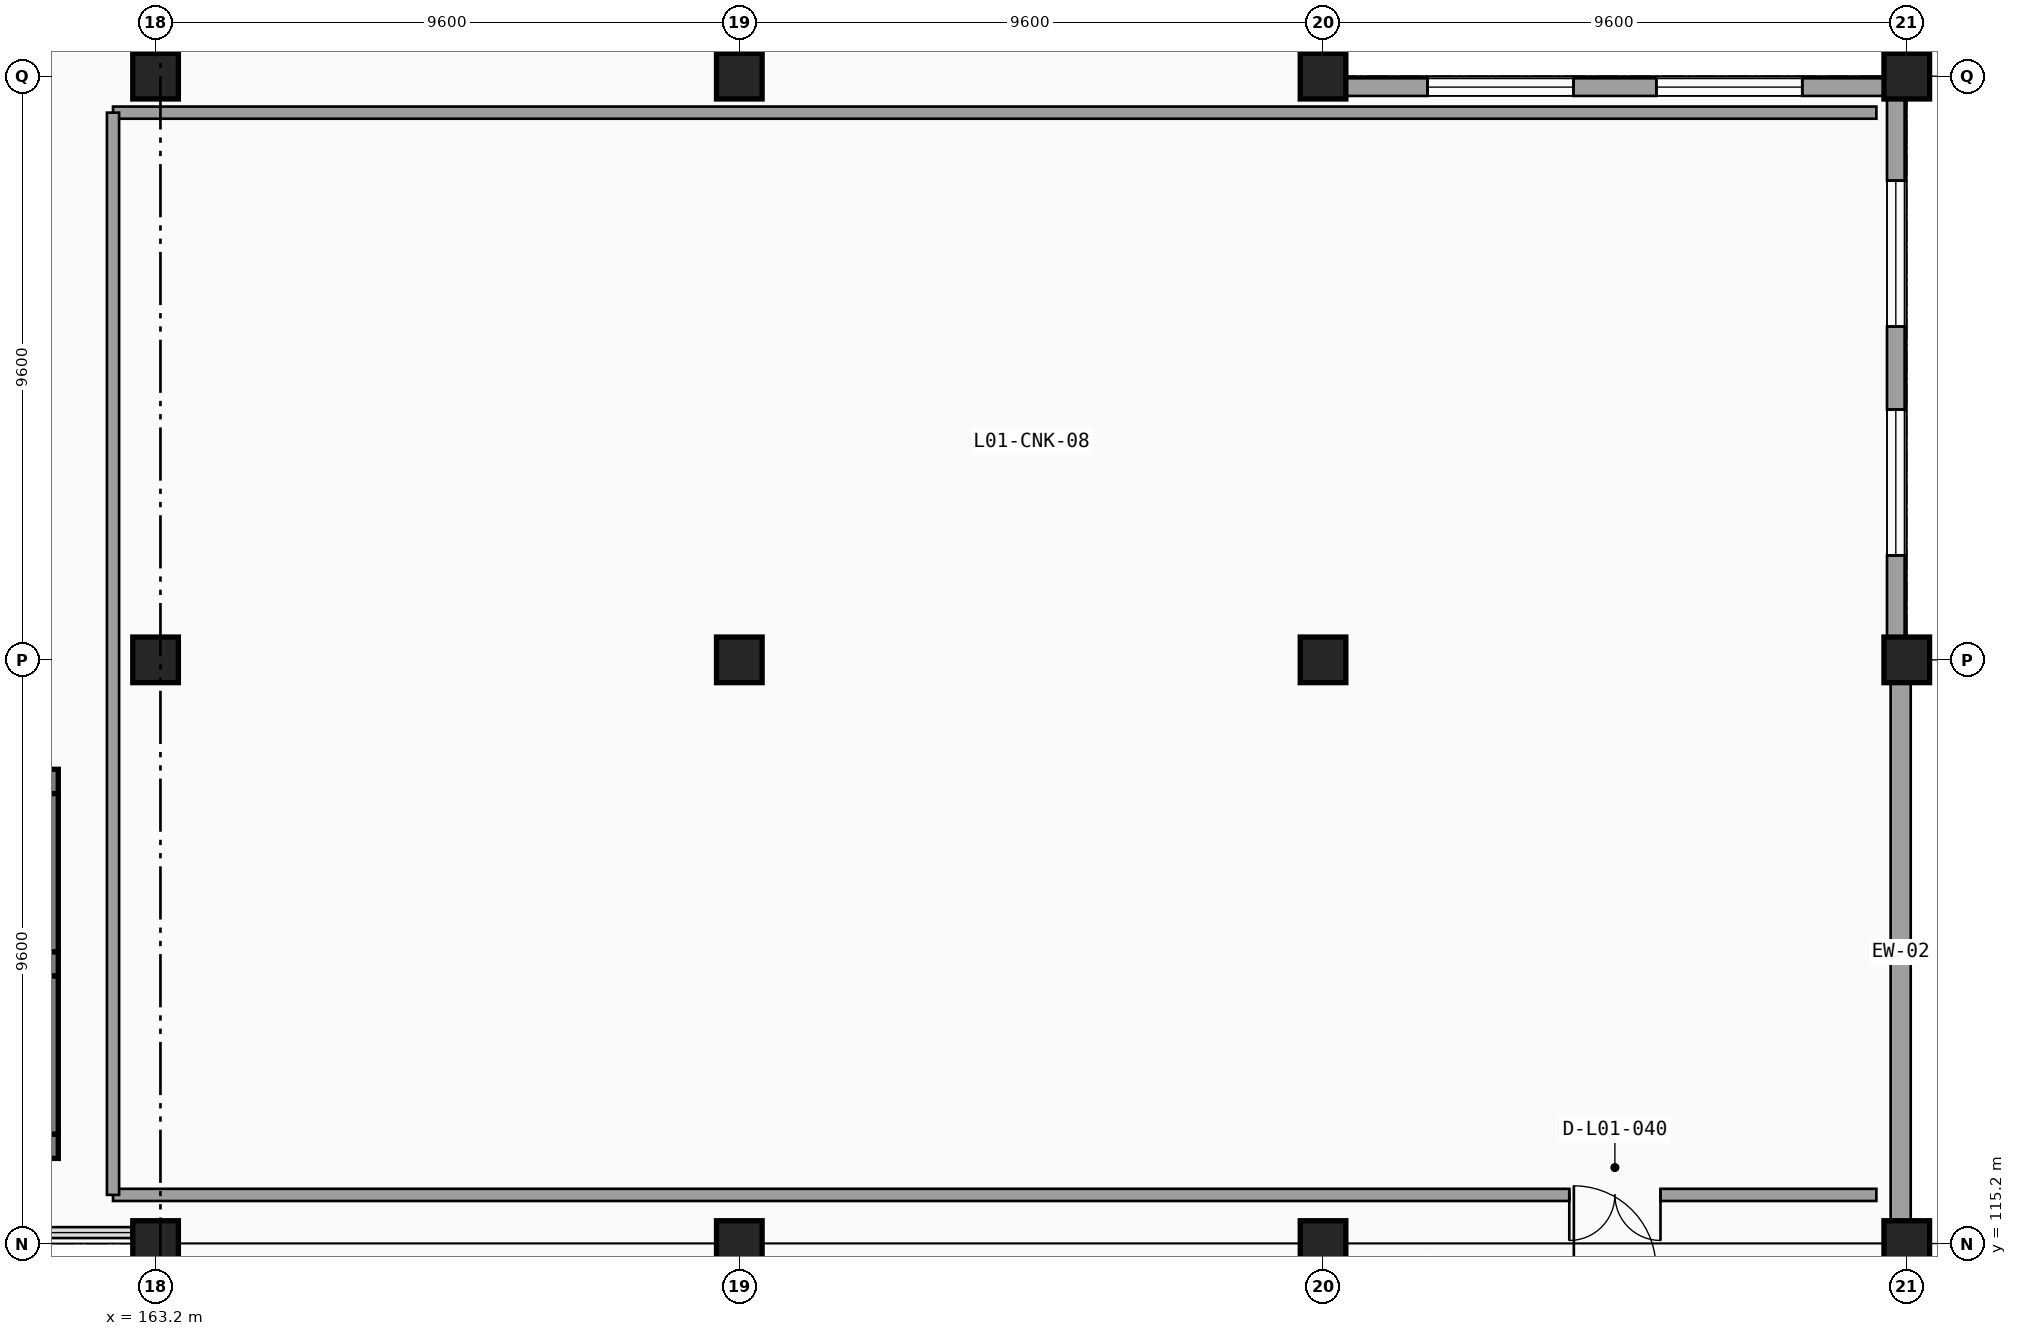
"""IFC4 building model, lengths in metres.
Left out: names, types, materials, properties, quantities, classifications, styles, units other than length and angle.
Written with IfcOpenShell. Run it as: python <this file> out.ifc"""

import sys

from ifc_helpers import new_model, si_unit, direction, frame, frame_2d, origin, origin_2d, place, context, subcontext, project, spatial, rectangle, extrude, element, fill, save


model = new_model("IFC4")
c1 = context("Model", 3, precision=1e-05, world=origin(), true_north=direction((0.0, 1.0)))
c2 = subcontext(c1, "Body", "Model", "MODEL_VIEW")
j1 = project(units=[si_unit("LENGTHUNIT", "METRE"), si_unit("PLANEANGLEUNIT", "RADIAN")], contexts=[c1])
p1 = place(None, origin())
s1 = spatial("IfcSite", under=j1, at=p1, CompositionType="ELEMENT")
p2 = place(p1, origin())
s2 = spatial("IfcBuilding", under=s1, at=p2, CompositionType="ELEMENT")
p3 = place(p2, frame((0.0, 0.0, 4.8)))
s3 = spatial("IfcBuildingStorey", under=s2, at=p3, CompositionType="ELEMENT", Elevation=4.8)
for number, where, z_axis, x_axis in (
    (1, (163.2, 115.2, 0.0), (0.0, 0.0, 1.0), (1.0, 0.0, 0.0)),
    (2, (163.2, 124.8, 0.0), (0.0, 0.0, 1.0), (1.0, 0.0, 0.0)),
    (3, (163.2, 134.4, 0.0), (0.0, 0.0, 1.0), (1.0, 0.0, 0.0)),
    (4, (172.8, 115.2, 0.0), (0.0, 0.0, 1.0), (1.0, 0.0, 0.0)),
    (5, (172.8, 124.8, 0.0), (0.0, 0.0, 1.0), (1.0, 0.0, 0.0)),
    (6, (172.8, 134.4, 0.0), (0.0, 0.0, 1.0), (1.0, 0.0, 0.0)),
    (7, (182.4, 115.2, 0.0), (0.0, 0.0, 1.0), (1.0, 0.0, 0.0)),
    (8, (182.4, 124.8, 0.0), (0.0, 0.0, 1.0), (1.0, 0.0, 0.0)),
    (9, (182.4, 134.4, 0.0), (0.0, 0.0, 1.0), (1.0, 0.0, 0.0)),
    (10, (192.0, 115.2, 0.0), (0.0, 0.0, 1.0), (1.0, 0.0, 0.0)),
    (11, (192.0, 124.8, 0.0), (0.0, 0.0, 1.0), (1.0, 0.0, 0.0)),
    (12, (192.0, 134.4, 0.0), (0.0, 0.0, 1.0), (1.0, 0.0, 0.0)),
):
    element("IfcColumn", number, at=place(p3, frame(where, z_axis=z_axis, x_axis=x_axis)), inside=s3, PredefinedType="COLUMN", context=c2, shape_type="SweptSolid", body=[
        extrude(rectangle(XDim=0.75, YDim=0.75, at=origin_2d()), origin(), (0.0, 0.0, 1.0), 4.8),
    ])
p4 = place(p3, frame((191.9, 115.555, 0.0), z_axis=(0.0, 0.0, 1.0), x_axis=(0.0, 1.0, 0.0)))
e13 = element("IfcWall", 13, at=p4, inside=s3, PredefinedType="SOLIDWALL", context=c2, shape_type="SweptSolid", body=[
    extrude(rectangle(XDim=8.89, YDim=0.33, at=frame_2d((4.445, 0.0))), origin(), (0.0, 0.0, 1.0), 3.593),
])
p5 = place(p3, frame((191.82, 125.155, 0.0), z_axis=(0.0, 0.0, 1.0), x_axis=(0.0, 1.0, 0.0)))
e14 = element("IfcWall", 14, at=p5, inside=s3, PredefinedType="SOLIDWALL", context=c2, shape_type="SweptSolid", body=[
    extrude(rectangle(XDim=8.89, YDim=0.29, at=frame_2d((4.445, 0.0))), origin(), (0.0, 0.0, 1.0), 3.77),
])
p6 = place(p5, frame((3.763, 0.0, 0.95), z_axis=(0.0, 0.0, 1.0), x_axis=(-1.0, 0.0, 0.0)))
e15 = element("IfcOpeningElement", 15, at=p6, cuts=e14, PredefinedType="OPENING", context=c2, shape_type="SweptSolid", body=[
    extrude(rectangle(XDim=2.4, YDim=2.2, at=frame_2d((1.2, 1.1))), frame((0.0, 0.155, 0.0), z_axis=(0.0, -1.0, 0.0), x_axis=(1.0, 0.0, 0.0)), (0.0, 0.0, 1.0), 0.31),
])
p7 = place(p5, frame((7.527, 0.0, 0.95), z_axis=(0.0, 0.0, 1.0), x_axis=(-1.0, 0.0, 0.0)))
e16 = element("IfcOpeningElement", 16, at=p7, cuts=e14, PredefinedType="OPENING", context=c2, shape_type="SweptSolid", body=[
    extrude(rectangle(XDim=2.4, YDim=2.2, at=frame_2d((1.2, 1.1))), frame((0.0, 0.155, 0.0), z_axis=(0.0, -1.0, 0.0), x_axis=(1.0, 0.0, 0.0)), (0.0, 0.0, 1.0), 0.31),
])
p8 = place(p3, frame((191.645, 134.22, 0.0), z_axis=(0.0, 0.0, 1.0), x_axis=(-1.0, 0.0, 0.0)))
e17 = element("IfcWall", 17, at=p8, inside=s3, PredefinedType="SOLIDWALL", context=c2, shape_type="SweptSolid", body=[
    extrude(rectangle(XDim=8.89, YDim=0.29, at=frame_2d((4.445, 0.0))), origin(), (0.0, 0.0, 1.0), 3.758),
])
p9 = place(p8, frame((3.763, 0.0, 0.95), z_axis=(0.0, 0.0, 1.0), x_axis=(-1.0, 0.0, 0.0)))
e18 = element("IfcOpeningElement", 18, at=p9, cuts=e17, PredefinedType="OPENING", context=c2, shape_type="SweptSolid", body=[
    extrude(rectangle(XDim=2.4, YDim=2.2, at=frame_2d((1.2, 1.1))), frame((0.0, 0.155, 0.0), z_axis=(0.0, -1.0, 0.0), x_axis=(1.0, 0.0, 0.0)), (0.0, 0.0, 1.0), 0.31),
])
p10 = place(p8, frame((7.527, 0.0, 0.95), z_axis=(0.0, 0.0, 1.0), x_axis=(-1.0, 0.0, 0.0)))
e19 = element("IfcOpeningElement", 19, at=p10, cuts=e17, PredefinedType="OPENING", context=c2, shape_type="SweptSolid", body=[
    extrude(rectangle(XDim=2.4, YDim=2.2, at=frame_2d((1.2, 1.1))), frame((0.0, 0.155, 0.0), z_axis=(0.0, -1.0, 0.0), x_axis=(1.0, 0.0, 0.0)), (0.0, 0.0, 1.0), 0.31),
])
p11 = place(p3, frame((182.22, 134.755, 0.0), z_axis=(0.0, 0.0, 1.0), x_axis=(0.0, 1.0, 0.0)))
e20 = element("IfcWall", 20, at=p11, inside=s3, PredefinedType="SOLIDWALL", context=c2, shape_type="SweptSolid", body=[
    extrude(rectangle(XDim=8.89, YDim=0.29, at=frame_2d((4.445, 0.0))), origin(), (0.0, 0.0, 1.0), 3.913),
])
p12 = place(p11, frame((3.763, 0.0, 0.95), z_axis=(0.0, 0.0, 1.0), x_axis=(-1.0, 0.0, 0.0)))
e21 = element("IfcOpeningElement", 21, at=p12, cuts=e20, PredefinedType="OPENING", context=c2, shape_type="SweptSolid", body=[
    extrude(rectangle(XDim=2.4, YDim=2.2, at=frame_2d((1.2, 1.1))), frame((0.0, 0.155, 0.0), z_axis=(0.0, -1.0, 0.0), x_axis=(1.0, 0.0, 0.0)), (0.0, 0.0, 1.0), 0.31),
])
p13 = place(p11, frame((7.527, 0.0, 0.95), z_axis=(0.0, 0.0, 1.0), x_axis=(-1.0, 0.0, 0.0)))
e22 = element("IfcOpeningElement", 22, at=p13, cuts=e20, PredefinedType="OPENING", context=c2, shape_type="SweptSolid", body=[
    extrude(rectangle(XDim=2.4, YDim=2.2, at=frame_2d((1.2, 1.1))), frame((0.0, 0.155, 0.0), z_axis=(0.0, -1.0, 0.0), x_axis=(1.0, 0.0, 0.0)), (0.0, 0.0, 1.0), 0.31),
])
for number, where, z_axis, x_axis in (
    (23, (158.4, 116.8, 0.0), (0.0, 0.0, 1.0), (1.0, 0.0, 0.0)),
    (24, (161.6, 119.8, 0.0), (0.0, 0.0, 1.0), (-1.0, 0.0, 0.0)),
):
    element("IfcWall", number, at=place(p3, frame(where, z_axis=z_axis, x_axis=x_axis)), inside=s3, PredefinedType="SHEAR", context=c2, shape_type="SweptSolid", body=[
        extrude(rectangle(XDim=3.2, YDim=0.4, at=frame_2d((1.6, 0.0))), origin(), (0.0, 0.0, 1.0), 4.52),
    ])
p14 = place(p3, frame((161.4, 117.0, 0.0), z_axis=(0.0, 0.0, 1.0), x_axis=(0.0, 1.0, 0.0)))
e25 = element("IfcWall", 25, at=p14, inside=s3, PredefinedType="SHEAR", context=c2, shape_type="SweptSolid", body=[
    extrude(rectangle(XDim=2.6, YDim=0.4, at=frame_2d((1.3, 0.0))), origin(), (0.0, 0.0, 1.0), 4.52),
])
p15 = place(p3, frame((161.6, 122.8, 0.0), z_axis=(0.0, 0.0, 1.0), x_axis=(-1.0, 0.0, 0.0)))
e26 = element("IfcWall", 26, at=p15, inside=s3, PredefinedType="SHEAR", context=c2, shape_type="SweptSolid", body=[
    extrude(rectangle(XDim=3.2, YDim=0.4, at=frame_2d((1.6, 0.0))), origin(), (0.0, 0.0, 1.0), 4.52),
])
p16 = place(p3, frame((161.4, 120.0, 0.0), z_axis=(0.0, 0.0, 1.0), x_axis=(0.0, 1.0, 0.0)))
e27 = element("IfcWall", 27, at=p16, inside=s3, PredefinedType="SHEAR", context=c2, shape_type="SweptSolid", body=[
    extrude(rectangle(XDim=2.6, YDim=0.4, at=frame_2d((1.3, 0.0))), origin(), (0.0, 0.0, 1.0), 4.52),
])
p17 = place(p3, frame((162.5, 133.8, 0.0), z_axis=(0.0, 0.0, 1.0), x_axis=(1.0, 0.0, 0.0)))
e28 = element("IfcWall", 28, at=p17, inside=s3, PredefinedType="PARTITIONING", context=c2, shape_type="SweptSolid", body=[
    extrude(rectangle(XDim=29.0, YDim=0.2, at=frame_2d((14.5, 0.0))), origin(), (0.0, 0.0, 1.0), 3.77),
])
p18 = place(p3, frame((191.5, 116.0, 0.0), z_axis=(0.0, 0.0, 1.0), x_axis=(-1.0, 0.0, 0.0)))
e29 = element("IfcWall", 29, at=p18, inside=s3, PredefinedType="PARTITIONING", context=c2, shape_type="SweptSolid", body=[
    extrude(rectangle(XDim=29.0, YDim=0.2, at=frame_2d((14.5, 0.0))), origin(), (0.0, 0.0, 1.0), 3.593),
])
p19 = place(p18, frame((3.55, 0.0, 0.0), z_axis=(0.0, 0.0, 1.0), x_axis=(1.0, 0.0, 0.0)))
e30 = element("IfcOpeningElement", 30, at=p19, cuts=e29, PredefinedType="OPENING", context=c2, shape_type="SweptSolid", body=[
    extrude(rectangle(XDim=1.5, YDim=2.25, at=frame_2d((0.75, 1.125))), frame((0.0, 0.11, 0.0), z_axis=(0.0, -1.0, 0.0), x_axis=(1.0, 0.0, 0.0)), (0.0, 0.0, 1.0), 0.22),
])
p20 = place(p3, frame((162.5, 116.0, 0.0), z_axis=(0.0, 0.0, 1.0), x_axis=(0.0, 1.0, 0.0)))
e31 = element("IfcWall", 31, at=p20, inside=s3, PredefinedType="PARTITIONING", context=c2, shape_type="SweptSolid", body=[
    extrude(rectangle(XDim=17.8, YDim=0.2, at=frame_2d((8.9, 0.0))), origin(), (0.0, 0.0, 1.0), 3.758),
])
p21 = place(p6, origin())
e32 = element("IfcWindow", 32, at=p21, inside=s3, PartitioningType="SINGLE_PANEL", PredefinedType="WINDOW", context=c2, shape_type="SweptSolid", body=[
    extrude(rectangle(XDim=2.4, YDim=2.2, at=frame_2d((1.2, 1.1))), frame((0.0, 0.03, 0.0), z_axis=(0.0, -1.0, 0.0), x_axis=(1.0, 0.0, 0.0)), (0.0, 0.0, 1.0), 0.06),
])
fill(e15, e32)
p22 = place(p7, origin())
e33 = element("IfcWindow", 33, at=p22, inside=s3, PartitioningType="SINGLE_PANEL", PredefinedType="WINDOW", context=c2, shape_type="SweptSolid", body=[
    extrude(rectangle(XDim=2.4, YDim=2.2, at=frame_2d((1.2, 1.1))), frame((0.0, 0.03, 0.0), z_axis=(0.0, -1.0, 0.0), x_axis=(1.0, 0.0, 0.0)), (0.0, 0.0, 1.0), 0.06),
])
fill(e16, e33)
p23 = place(p9, origin())
e34 = element("IfcWindow", 34, at=p23, inside=s3, PartitioningType="SINGLE_PANEL", PredefinedType="WINDOW", context=c2, shape_type="SweptSolid", body=[
    extrude(rectangle(XDim=2.4, YDim=2.2, at=frame_2d((1.2, 1.1))), frame((0.0, 0.03, 0.0), z_axis=(0.0, -1.0, 0.0), x_axis=(1.0, 0.0, 0.0)), (0.0, 0.0, 1.0), 0.06),
])
fill(e18, e34)
p24 = place(p10, origin())
e35 = element("IfcWindow", 35, at=p24, inside=s3, PartitioningType="SINGLE_PANEL", PredefinedType="WINDOW", context=c2, shape_type="SweptSolid", body=[
    extrude(rectangle(XDim=2.4, YDim=2.2, at=frame_2d((1.2, 1.1))), frame((0.0, 0.03, 0.0), z_axis=(0.0, -1.0, 0.0), x_axis=(1.0, 0.0, 0.0)), (0.0, 0.0, 1.0), 0.06),
])
fill(e19, e35)
p25 = place(p19, origin())
e36 = element("IfcDoor", 36, at=p25, inside=s3, OperationType="DOUBLE_DOOR_SINGLE_SWING", PredefinedType="DOOR", context=c2, shape_type="SweptSolid", body=[
    extrude(rectangle(XDim=1.5, YDim=2.25, at=frame_2d((0.75, 1.125))), frame((0.0, 0.025, 0.0), z_axis=(0.0, -1.0, 0.0), x_axis=(1.0, 0.0, 0.0)), (0.0, 0.0, 1.0), 0.05),
])
fill(e30, e36)
save(model, sys.argv[1])
